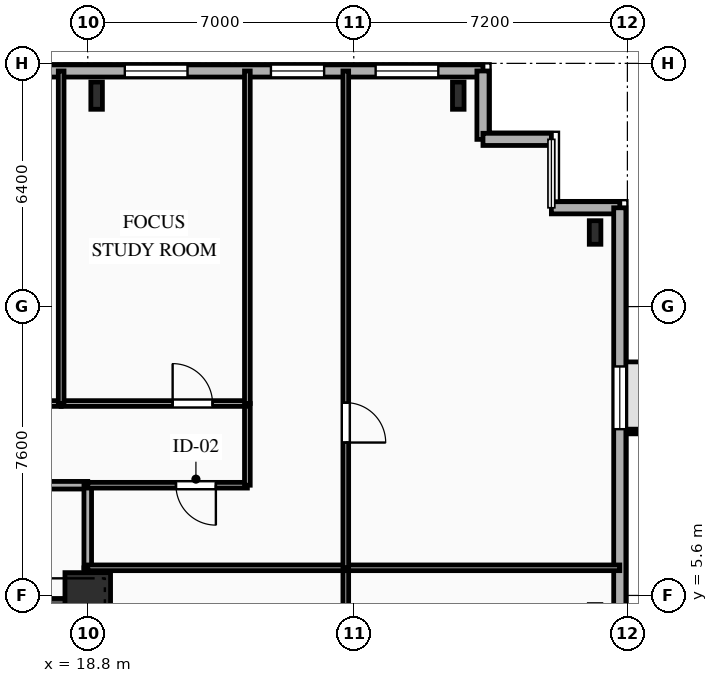
"""IFC4 building model, lengths in metres.
Left out: names, types, materials, properties, quantities, classifications, styles, units other than length and angle.
Written with IfcOpenShell. Run it as: python <this file> out.ifc"""

import sys

from ifc_helpers import new_model, si_unit, direction, frame, frame_2d, origin, origin_2d, place, context, subcontext, project, spatial, rectangle, i_section, extrude, element, fill, save


model = new_model("IFC4")
c1 = context("Model", 3, precision=1e-05, world=origin(), true_north=direction((0.0, 1.0)))
c2 = subcontext(c1, "Body", "Model", "MODEL_VIEW")
j1 = project(units=[si_unit("LENGTHUNIT", "METRE"), si_unit("PLANEANGLEUNIT", "RADIAN")], contexts=[c1])
p1 = place(None, origin())
s1 = spatial("IfcSite", under=j1, at=p1, CompositionType="ELEMENT")
p2 = place(p1, origin())
s2 = spatial("IfcBuilding", under=s1, at=p2, CompositionType="ELEMENT")
p3 = place(p2, frame((0.0, 0.0, 40.4)))
s3 = spatial("IfcBuildingStorey", under=s2, at=p3, CompositionType="ELEMENT", Elevation=40.4)
p4 = place(p3, frame((18.8, 5.6, 0.0), z_axis=(0.0, 0.0, 1.0), x_axis=(1.0, 0.0, 0.0)))
e1 = element("IfcColumn", 1, at=p4, inside=s3, PredefinedType="COLUMN", context=c2, shape_type="SweptSolid", body=[
    extrude(rectangle(XDim=1.2, YDim=1.2, at=origin_2d()), origin(), (0.0, 0.0, 1.0), 3.35),
])
for number, where, z_axis, x_axis in (
    (2, (28.55, 18.75, 0.0), (0.0, 0.0, 1.0), (1.0, 0.0, 0.0)),
    (3, (19.033, 18.75, 0.0), (0.0, 0.0, 1.0), (1.0, 0.0, 0.0)),
):
    element("IfcColumn", number, at=place(p3, frame(where, z_axis=z_axis, x_axis=x_axis)), inside=s3, PredefinedType="COLUMN", context=c2, shape_type="SweptSolid", body=[
        extrude(i_section(OverallWidth=0.304, OverallDepth=0.716, WebThickness=0.021, FlangeThickness=0.04, FilletRadius=0.027, at=origin_2d()), origin(), (0.0, 0.0, 1.0), 3.35),
    ])
p5 = place(p3, frame((32.15, 15.15, 0.0), z_axis=(0.0, 0.0, 1.0), x_axis=(1.0, 0.0, 0.0)))
e4 = element("IfcColumn", 4, at=p5, inside=s3, PredefinedType="COLUMN", context=c2, shape_type="SweptSolid", body=[
    extrude(i_section(OverallWidth=0.305, OverallDepth=0.62, WebThickness=0.021, FlangeThickness=0.04, FilletRadius=0.027, at=origin_2d()), origin(), (0.0, 0.0, 1.0), 3.35),
])
p6 = place(p3, frame((-29.2, 19.4, 0.0), z_axis=(0.0, 0.0, 1.0), x_axis=(1.0, 0.0, 0.0)))
e5 = element("IfcWall", 5, at=p6, inside=s3, PredefinedType="SOLIDWALL", context=c2, shape_type="SweptSolid", body=[
    extrude(rectangle(XDim=58.4, YDim=0.32, at=frame_2d((29.2, 0.0))), origin(), (0.0, 0.0, 1.0), 3.035),
])
p7 = place(p6, frame((10.596, 0.0, 0.85)))
e6 = element("IfcOpeningElement", 6, at=p7, cuts=e5, PredefinedType="OPENING", context=c2, shape_type="SweptSolid", body=[
    extrude(rectangle(XDim=1.65, YDim=1.85, at=frame_2d((0.825, 0.925))), frame((0.0, 0.17, 0.0), z_axis=(0.0, -1.0, 0.0), x_axis=(1.0, 0.0, 0.0)), (0.0, 0.0, 1.0), 0.34),
])
p8 = place(p6, frame((19.85, 0.0, 0.85)))
e7 = element("IfcOpeningElement", 7, at=p8, cuts=e5, PredefinedType="OPENING", context=c2, shape_type="SweptSolid", body=[
    extrude(rectangle(XDim=1.5, YDim=1.85, at=frame_2d((0.75, 0.925))), frame((0.0, 0.17, 0.0), z_axis=(0.0, -1.0, 0.0), x_axis=(1.0, 0.0, 0.0)), (0.0, 0.0, 1.0), 0.34),
])
p9 = place(p6, frame((26.516, 0.0, 0.85)))
e8 = element("IfcOpeningElement", 8, at=p9, cuts=e5, PredefinedType="OPENING", context=c2, shape_type="SweptSolid", body=[
    extrude(rectangle(XDim=2.2, YDim=1.85, at=frame_2d((1.1, 0.925))), frame((0.0, 0.17, 0.0), z_axis=(0.0, -1.0, 0.0), x_axis=(1.0, 0.0, 0.0)), (0.0, 0.0, 1.0), 0.34),
])
p10 = place(p6, frame((35.716, 0.0, 0.85)))
e9 = element("IfcOpeningElement", 9, at=p10, cuts=e5, PredefinedType="OPENING", context=c2, shape_type="SweptSolid", body=[
    extrude(rectangle(XDim=2.2, YDim=1.85, at=frame_2d((1.1, 0.925))), frame((0.0, 0.17, 0.0), z_axis=(0.0, -1.0, 0.0), x_axis=(1.0, 0.0, 0.0)), (0.0, 0.0, 1.0), 0.34),
])
p11 = place(p6, frame((44.095, 0.0, 0.85)))
e10 = element("IfcOpeningElement", 10, at=p11, cuts=e5, PredefinedType="OPENING", context=c2, shape_type="SweptSolid", body=[
    extrude(rectangle(XDim=1.65, YDim=1.85, at=frame_2d((0.825, 0.925))), frame((0.0, 0.17, 0.0), z_axis=(0.0, -1.0, 0.0), x_axis=(1.0, 0.0, 0.0)), (0.0, 0.0, 1.0), 0.34),
])
p12 = place(p6, frame((48.975, 0.0, 0.85)))
e11 = element("IfcOpeningElement", 11, at=p12, cuts=e5, PredefinedType="OPENING", context=c2, shape_type="SweptSolid", body=[
    extrude(rectangle(XDim=1.65, YDim=1.85, at=frame_2d((0.825, 0.925))), frame((0.0, 0.17, 0.0), z_axis=(0.0, -1.0, 0.0), x_axis=(1.0, 0.0, 0.0)), (0.0, 0.0, 1.0), 0.34),
])
p13 = place(p6, frame((52.82, 0.0, 0.85)))
e12 = element("IfcOpeningElement", 12, at=p13, cuts=e5, PredefinedType="OPENING", context=c2, shape_type="SweptSolid", body=[
    extrude(rectangle(XDim=1.4, YDim=1.85, at=frame_2d((0.7, 0.925))), frame((0.0, 0.17, 0.0), z_axis=(0.0, -1.0, 0.0), x_axis=(1.0, 0.0, 0.0)), (0.0, 0.0, 1.0), 0.34),
])
p14 = place(p6, frame((55.575, 0.0, 0.85)))
e13 = element("IfcOpeningElement", 13, at=p14, cuts=e5, PredefinedType="OPENING", context=c2, shape_type="SweptSolid", body=[
    extrude(rectangle(XDim=1.65, YDim=1.85, at=frame_2d((0.825, 0.925))), frame((0.0, 0.17, 0.0), z_axis=(0.0, -1.0, 0.0), x_axis=(1.0, 0.0, 0.0)), (0.0, 0.0, 1.0), 0.34),
])
p15 = place(p3, frame((29.2, 19.4, 0.0), z_axis=(0.0, 0.0, 1.0), x_axis=(0.0, -1.0, 0.0)))
e14 = element("IfcWall", 14, at=p15, inside=s3, PredefinedType="SOLIDWALL", context=c2, shape_type="SweptSolid", body=[
    extrude(rectangle(XDim=1.8, YDim=0.32, at=frame_2d((0.9, 0.0))), origin(), (0.0, 0.0, 1.0), 3.035),
])
for number, where, z_axis, x_axis in (
    (15, (29.2, 17.6, 0.0), (0.0, 0.0, 1.0), (1.0, 0.0, 0.0)),
    (16, (31.0, 15.8, 0.0), (0.0, 0.0, 1.0), (1.0, 0.0, 0.0)),
):
    element("IfcWall", number, at=place(p3, frame(where, z_axis=z_axis, x_axis=x_axis)), inside=s3, PredefinedType="SOLIDWALL", context=c2, shape_type="SweptSolid", body=[
        extrude(rectangle(XDim=1.8, YDim=0.32, at=frame_2d((0.9, 0.0))), origin(), (0.0, 0.0, 1.0), 3.035),
    ])
p16 = place(p3, frame((32.8, 15.8, 0.0), z_axis=(0.0, 0.0, 1.0), x_axis=(0.0, -1.0, 0.0)))
e17 = element("IfcWall", 17, at=p16, inside=s3, PredefinedType="SOLIDWALL", context=c2, shape_type="SweptSolid", body=[
    extrude(rectangle(XDim=31.6, YDim=0.32, at=frame_2d((15.8, 0.0))), origin(), (0.0, 0.0, 1.0), 3.035),
])
p17 = place(p16, frame((4.175, 0.0, 0.85)))
e18 = element("IfcOpeningElement", 18, at=p17, cuts=e17, PredefinedType="OPENING", context=c2, shape_type="SweptSolid", body=[
    extrude(rectangle(XDim=1.65, YDim=1.85, at=frame_2d((0.825, 0.925))), frame((0.0, 0.17, 0.0), z_axis=(0.0, -1.0, 0.0), x_axis=(1.0, 0.0, 0.0)), (0.0, 0.0, 1.0), 0.34),
])
p18 = place(p16, frame((15.015, 0.0, 0.85)))
e19 = element("IfcOpeningElement", 19, at=p18, cuts=e17, PredefinedType="OPENING", context=c2, shape_type="SweptSolid", body=[
    extrude(rectangle(XDim=1.65, YDim=1.85, at=frame_2d((0.825, 0.925))), frame((0.0, 0.17, 0.0), z_axis=(0.0, -1.0, 0.0), x_axis=(1.0, 0.0, 0.0)), (0.0, 0.0, 1.0), 0.34),
])
p19 = place(p16, frame((25.855, 0.0, 0.85)))
e20 = element("IfcOpeningElement", 20, at=p19, cuts=e17, PredefinedType="OPENING", context=c2, shape_type="SweptSolid", body=[
    extrude(rectangle(XDim=1.65, YDim=1.85, at=frame_2d((0.825, 0.925))), frame((0.0, 0.17, 0.0), z_axis=(0.0, -1.0, 0.0), x_axis=(1.0, 0.0, 0.0)), (0.0, 0.0, 1.0), 0.34),
])
p20 = place(p3, frame((9.2, 5.24, 0.0), z_axis=(0.0, 0.0, 1.0), x_axis=(1.0, 0.0, 0.0)))
e21 = element("IfcWall", 21, at=p20, inside=s3, PredefinedType="SHEAR", context=c2, shape_type="SweptSolid", body=[
    extrude(rectangle(XDim=9.6, YDim=0.56, at=frame_2d((4.8, 0.0))), origin(), (0.0, 0.0, 1.0), 3.035),
])
p21 = place(p20, frame((6.95, 0.0, 0.0)))
e22 = element("IfcOpeningElement", 22, at=p21, cuts=e21, PredefinedType="OPENING", context=c2, shape_type="SweptSolid", body=[
    extrude(rectangle(XDim=1.1, YDim=2.15, at=frame_2d((0.55, 1.075))), frame((0.0, 0.29, 0.0), z_axis=(0.0, -1.0, 0.0), x_axis=(1.0, 0.0, 0.0)), (0.0, 0.0, 1.0), 0.58),
])
p22 = place(p20, frame((3.775, 0.0, 0.0)))
e23 = element("IfcOpeningElement", 23, at=p22, cuts=e21, PredefinedType="OPENING", context=c2, shape_type="SweptSolid", body=[
    extrude(rectangle(XDim=1.05, YDim=2.1, at=frame_2d((0.525, 1.05))), frame((0.0, 0.29, 0.0), z_axis=(0.0, -1.0, 0.0), x_axis=(1.0, 0.0, 0.0)), (0.0, 0.0, 1.0), 0.58),
])
p23 = place(p3, frame((18.8, 8.5, 0.0), z_axis=(0.0, 0.0, 1.0), x_axis=(-1.0, 0.0, 0.0)))
e24 = element("IfcWall", 24, at=p23, inside=s3, PredefinedType="PARTITIONING", context=c2, shape_type="SweptSolid", body=[
    extrude(rectangle(XDim=6.8, YDim=0.2, at=frame_2d((3.4, 0.0))), origin(), (0.0, 0.0, 1.0), 3.035),
])
p24 = place(p23, frame((3.985, 0.0, 0.0)))
e25 = element("IfcOpeningElement", 25, at=p24, cuts=e24, PredefinedType="OPENING", context=c2, shape_type="SweptSolid", body=[
    extrude(rectangle(XDim=1.1, YDim=2.15, at=frame_2d((0.55, 1.075))), frame((0.0, 0.11, 0.0), z_axis=(0.0, -1.0, 0.0), x_axis=(1.0, 0.0, 0.0)), (0.0, 0.0, 1.0), 0.22),
])
p25 = place(p3, frame((18.8, 5.6, 0.0), z_axis=(0.0, 0.0, 1.0), x_axis=(0.0, 1.0, 0.0)))
e26 = element("IfcWall", 26, at=p25, inside=s3, PredefinedType="PARTITIONING", context=c2, shape_type="SweptSolid", body=[
    extrude(rectangle(XDim=0.727, YDim=0.2, at=frame_2d((0.363, 0.0))), origin(), (0.0, 0.0, 1.0), 2.52),
])
p26 = place(p3, frame((18.8, 6.327, 0.0), z_axis=(0.0, 0.0, 1.0), x_axis=(0.0, 1.0, 0.0)))
e27 = element("IfcWall", 27, at=p26, inside=s3, PredefinedType="PARTITIONING", context=c2, shape_type="SweptSolid", body=[
    extrude(rectangle(XDim=2.173, YDim=0.2, at=frame_2d((1.086, 0.0))), origin(), (0.0, 0.0, 1.0), 2.52),
])
p27 = place(p3, frame((23.0, 8.5, 0.0), z_axis=(0.0, 0.0, 1.0), x_axis=(-1.0, 0.0, 0.0)))
e28 = element("IfcWall", 28, at=p27, inside=s3, PredefinedType="PARTITIONING", context=c2, shape_type="SweptSolid", body=[
    extrude(rectangle(XDim=4.2, YDim=0.15, at=frame_2d((2.1, 0.0))), origin(), (0.0, 0.0, 1.0), 3.035),
])
p28 = place(p27, frame((0.829, 0.0, 0.0)))
e29 = element("IfcOpeningElement", 29, at=p28, cuts=e28, PredefinedType="OPENING", context=c2, shape_type="SweptSolid", body=[
    extrude(rectangle(XDim=1.05, YDim=2.15, at=frame_2d((0.525, 1.075))), frame((0.0, 0.085, 0.0), z_axis=(0.0, -1.0, 0.0), x_axis=(1.0, 0.0, 0.0)), (0.0, 0.0, 1.0), 0.17),
])
p29 = place(p3, frame((23.0, 10.65, 0.0), z_axis=(0.0, 0.0, 1.0), x_axis=(0.0, -1.0, 0.0)))
e30 = element("IfcWall", 30, at=p29, inside=s3, PredefinedType="PARTITIONING", context=c2, shape_type="SweptSolid", body=[
    extrude(rectangle(XDim=2.15, YDim=0.15, at=frame_2d((1.075, 0.0))), origin(), (0.0, 0.0, 1.0), 3.035),
])
p30 = place(p3, frame((13.2, 10.65, 0.0), z_axis=(0.0, 0.0, 1.0), x_axis=(1.0, 0.0, 0.0)))
e31 = element("IfcWall", 31, at=p30, inside=s3, PredefinedType="PARTITIONING", context=c2, shape_type="SweptSolid", body=[
    extrude(rectangle(XDim=4.9, YDim=0.15, at=frame_2d((2.45, 0.0))), origin(), (0.0, 0.0, 1.0), 3.035),
])
p31 = place(p30, frame((0.916, 0.0, 0.0)))
e32 = element("IfcOpeningElement", 32, at=p31, cuts=e31, PredefinedType="OPENING", context=c2, shape_type="SweptSolid", body=[
    extrude(rectangle(XDim=1.05, YDim=2.15, at=frame_2d((0.525, 1.075))), frame((0.0, 0.085, 0.0), z_axis=(0.0, -1.0, 0.0), x_axis=(1.0, 0.0, 0.0)), (0.0, 0.0, 1.0), 0.17),
])
p32 = place(p3, frame((18.1, 10.65, 0.0), z_axis=(0.0, 0.0, 1.0), x_axis=(1.0, 0.0, 0.0)))
e33 = element("IfcWall", 33, at=p32, inside=s3, PredefinedType="PARTITIONING", context=c2, shape_type="SweptSolid", body=[
    extrude(rectangle(XDim=4.9, YDim=0.15, at=frame_2d((2.45, 0.0))), origin(), (0.0, 0.0, 1.0), 3.035),
])
p33 = place(p32, frame((2.934, 0.0, 0.0)))
e34 = element("IfcOpeningElement", 34, at=p33, cuts=e33, PredefinedType="OPENING", context=c2, shape_type="SweptSolid", body=[
    extrude(rectangle(XDim=1.05, YDim=2.15, at=frame_2d((0.525, 1.075))), frame((0.0, 0.085, 0.0), z_axis=(0.0, -1.0, 0.0), x_axis=(1.0, 0.0, 0.0)), (0.0, 0.0, 1.0), 0.17),
])
p34 = place(p3, frame((25.59, 6.327, 0.0), z_axis=(0.0, 0.0, 1.0), x_axis=(0.0, -1.0, 0.0)))
e35 = element("IfcWall", 35, at=p34, inside=s3, PredefinedType="PARTITIONING", context=c2, shape_type="SweptSolid", body=[
    extrude(rectangle(XDim=12.654, YDim=0.15, at=frame_2d((6.327, 0.0))), origin(), (0.0, 0.0, 1.0), 2.69),
])
p35 = place(p34, frame((5.802, 0.0, 0.0)))
e36 = element("IfcOpeningElement", 36, at=p35, cuts=e35, PredefinedType="OPENING", context=c2, shape_type="SweptSolid", body=[
    extrude(rectangle(XDim=1.05, YDim=2.15, at=frame_2d((0.525, 1.075))), frame((0.0, 0.085, 0.0), z_axis=(0.0, -1.0, 0.0), x_axis=(1.0, 0.0, 0.0)), (0.0, 0.0, 1.0), 0.17),
])
p36 = place(p3, frame((18.8, 6.327, 0.0), z_axis=(0.0, 0.0, 1.0), x_axis=(1.0, 0.0, 0.0)))
e37 = element("IfcWall", 37, at=p36, inside=s3, PredefinedType="PARTITIONING", context=c2, shape_type="SweptSolid", body=[
    extrude(rectangle(XDim=6.79, YDim=0.15, at=frame_2d((3.395, 0.0))), origin(), (0.0, 0.0, 1.0), 3.035),
])
p37 = place(p3, frame((25.59, 6.327, 0.0), z_axis=(0.0, 0.0, 1.0), x_axis=(1.0, 0.0, 0.0)))
e38 = element("IfcWall", 38, at=p37, inside=s3, PredefinedType="PARTITIONING", context=c2, shape_type="SweptSolid", body=[
    extrude(rectangle(XDim=7.21, YDim=0.15, at=frame_2d((3.605, 0.0))), origin(), (0.0, 0.0, 1.0), 3.035),
])
p38 = place(p3, frame((25.59, 19.4, 0.0), z_axis=(0.0, 0.0, 1.0), x_axis=(0.0, -1.0, 0.0)))
e39 = element("IfcWall", 39, at=p38, inside=s3, PredefinedType="PARTITIONING", context=c2, shape_type="SweptSolid", body=[
    extrude(rectangle(XDim=13.073, YDim=0.15, at=frame_2d((6.537, 0.0))), origin(), (0.0, 0.0, 1.0), 2.69),
])
p39 = place(p38, frame((8.727, 0.0, 0.0)))
e40 = element("IfcOpeningElement", 40, at=p39, cuts=e39, PredefinedType="OPENING", context=c2, shape_type="SweptSolid", body=[
    extrude(rectangle(XDim=1.05, YDim=2.15, at=frame_2d((0.525, 1.075))), frame((0.0, 0.085, 0.0), z_axis=(0.0, -1.0, 0.0), x_axis=(1.0, 0.0, 0.0)), (0.0, 0.0, 1.0), 0.17),
])
for number, where, z_axis, x_axis in (
    (41, (23.0, 10.65, 0.0), (0.0, 0.0, 1.0), (0.0, 1.0, 0.0)),
    (42, (18.1, 19.4, 0.0), (0.0, 0.0, 1.0), (0.0, -1.0, 0.0)),
):
    element("IfcWall", number, at=place(p3, frame(where, z_axis=z_axis, x_axis=x_axis)), inside=s3, PredefinedType="PARTITIONING", context=c2, shape_type="SweptSolid", body=[
        extrude(rectangle(XDim=8.75, YDim=0.15, at=frame_2d((4.375, 0.0))), origin(), (0.0, 0.0, 1.0), 3.035),
    ])
p40 = place(p12, origin())
e43 = element("IfcWindow", 43, at=p40, inside=s3, PartitioningType="SINGLE_PANEL", PredefinedType="WINDOW", context=c2, shape_type="SweptSolid", body=[
    extrude(rectangle(XDim=1.65, YDim=1.85, at=frame_2d((0.825, 0.925))), frame((0.0, 0.03, 0.0), z_axis=(0.0, -1.0, 0.0), x_axis=(1.0, 0.0, 0.0)), (0.0, 0.0, 1.0), 0.06),
])
fill(e11, e43)
p41 = place(p13, origin())
e44 = element("IfcWindow", 44, at=p41, inside=s3, PartitioningType="SINGLE_PANEL", PredefinedType="WINDOW", context=c2, shape_type="SweptSolid", body=[
    extrude(rectangle(XDim=1.4, YDim=1.85, at=frame_2d((0.7, 0.925))), frame((0.0, 0.03, 0.0), z_axis=(0.0, -1.0, 0.0), x_axis=(1.0, 0.0, 0.0)), (0.0, 0.0, 1.0), 0.06),
])
fill(e12, e44)
p42 = place(p14, origin())
e45 = element("IfcWindow", 45, at=p42, inside=s3, PartitioningType="SINGLE_PANEL", PredefinedType="WINDOW", context=c2, shape_type="SweptSolid", body=[
    extrude(rectangle(XDim=1.65, YDim=1.85, at=frame_2d((0.825, 0.925))), frame((0.0, 0.03, 0.0), z_axis=(0.0, -1.0, 0.0), x_axis=(1.0, 0.0, 0.0)), (0.0, 0.0, 1.0), 0.06),
])
fill(e13, e45)
p43 = place(p17, origin())
e46 = element("IfcWindow", 46, at=p43, inside=s3, PartitioningType="SINGLE_PANEL", PredefinedType="WINDOW", context=c2, shape_type="SweptSolid", body=[
    extrude(rectangle(XDim=1.65, YDim=1.85, at=frame_2d((0.825, 0.925))), frame((0.0, 0.03, 0.0), z_axis=(0.0, -1.0, 0.0), x_axis=(1.0, 0.0, 0.0)), (0.0, 0.0, 1.0), 0.06),
])
fill(e18, e46)
p44 = place(p28, origin())
e47 = element("IfcDoor", 47, at=p44, inside=s3, OperationType="SINGLE_SWING_LEFT", PredefinedType="DOOR", context=c2, shape_type="SweptSolid", body=[
    extrude(rectangle(XDim=1.05, YDim=2.15, at=frame_2d((0.525, 1.075))), frame((0.0, 0.025, 0.0), z_axis=(0.0, -1.0, 0.0), x_axis=(1.0, 0.0, 0.0)), (0.0, 0.0, 1.0), 0.05),
])
fill(e29, e47)
p45 = place(p33, origin())
e48 = element("IfcDoor", 48, at=p45, inside=s3, OperationType="SINGLE_SWING_LEFT", PredefinedType="DOOR", context=c2, shape_type="SweptSolid", body=[
    extrude(rectangle(XDim=1.05, YDim=2.15, at=frame_2d((0.525, 1.075))), frame((0.0, 0.025, 0.0), z_axis=(0.0, -1.0, 0.0), x_axis=(1.0, 0.0, 0.0)), (0.0, 0.0, 1.0), 0.05),
])
fill(e34, e48)
p46 = place(p39, origin())
e49 = element("IfcDoor", 49, at=p46, inside=s3, OperationType="SINGLE_SWING_RIGHT", PredefinedType="DOOR", context=c2, shape_type="SweptSolid", body=[
    extrude(rectangle(XDim=1.05, YDim=2.15, at=frame_2d((0.525, 1.075))), frame((0.0, 0.025, 0.0), z_axis=(0.0, -1.0, 0.0), x_axis=(1.0, 0.0, 0.0)), (0.0, 0.0, 1.0), 0.05),
])
fill(e40, e49)
save(model, sys.argv[1])
